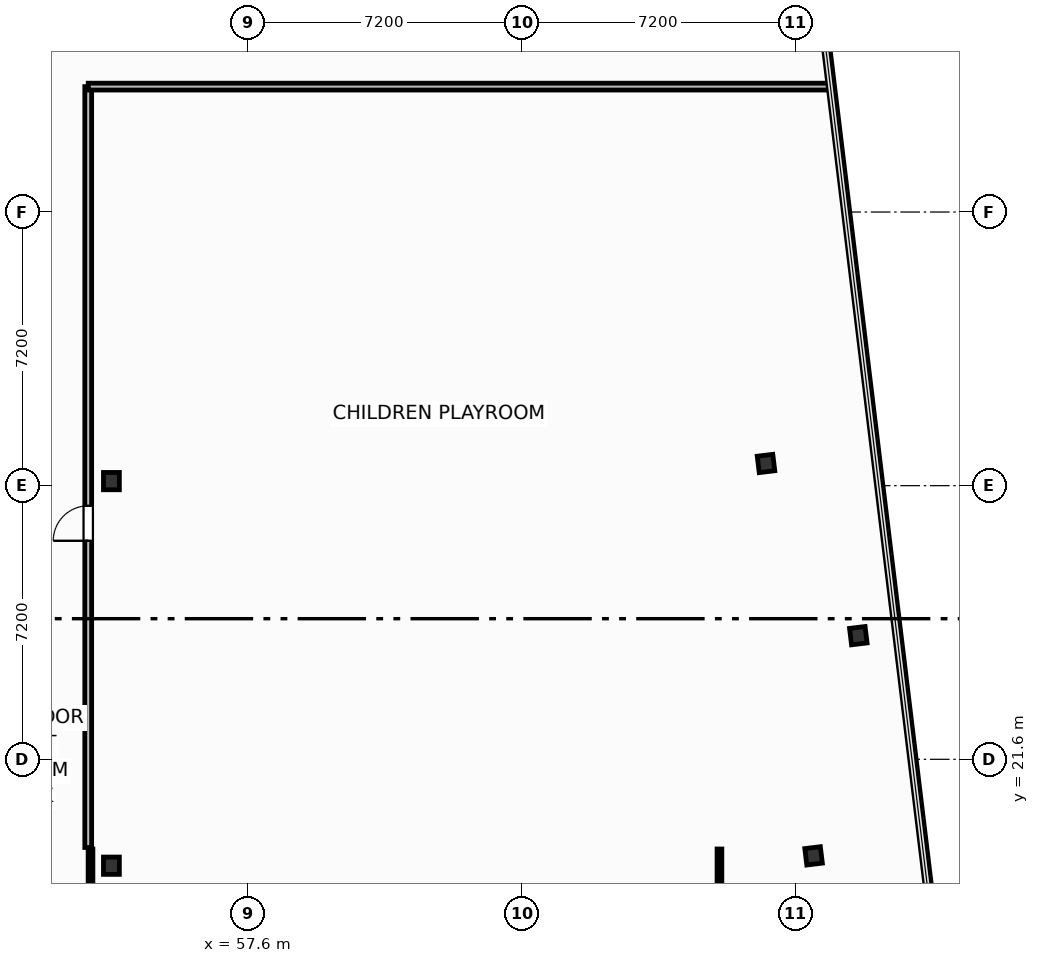
"""IFC4 building model, lengths in metres.
Left out: names, types, materials, properties, quantities, classifications, styles, units other than length and angle.
Written with IfcOpenShell. Run it as: python <this file> out.ifc"""

import sys

from ifc_helpers import new_model, si_unit, direction, frame, frame_2d, origin, origin_2d, place, context, subcontext, project, spatial, rectangle, i_section, extrude, element, fill, save


model = new_model("IFC4")
c1 = context("Model", 3, precision=1e-05, world=origin(), true_north=direction((0.0, 1.0)))
c2 = subcontext(c1, "Body", "Model", "MODEL_VIEW")
j1 = project(units=[si_unit("LENGTHUNIT", "METRE"), si_unit("PLANEANGLEUNIT", "RADIAN")], contexts=[c1])
p1 = place(None, origin())
s1 = spatial("IfcSite", under=j1, at=p1, CompositionType="ELEMENT")
p2 = place(p1, origin())
s2 = spatial("IfcBuilding", under=s1, at=p2, CompositionType="ELEMENT")
p3 = place(p2, frame((0.0, 0.0, 185.7)))
s3 = spatial("IfcBuildingStorey", under=s2, at=p3, CompositionType="ELEMENT", Elevation=185.7)
for number, where, z_axis, x_axis in (
    (1, (54.0, 18.8, 0.0), (0.0, 0.0, 1.0), (1.0, 0.0, 0.0)),
    (2, (54.0, 28.92, 0.0), (0.0, 0.0, 1.0), (1.0, 0.0, 0.0)),
):
    element("IfcColumn", number, at=place(p3, frame(where, z_axis=z_axis, x_axis=x_axis)), inside=s3, PredefinedType="COLUMN", context=c2, shape_type="SweptSolid", body=[
        extrude(i_section(OverallWidth=0.418, OverallDepth=0.455, WebThickness=0.042, FlangeThickness=0.068, FilletRadius=0.025, at=origin_2d()), origin(), (0.0, 0.0, 1.0), 3.7),
    ])
for number, where, z_axis, x_axis in (
    (3, (72.477, 19.059, 0.0), (0.0, 0.0, 1.0), (0.993, 0.12, 0.0)),
    (4, (73.654, 24.853, 0.0), (0.0, 0.0, 1.0), (0.993, 0.12, 0.0)),
    (5, (71.225, 29.384, 0.0), (0.0, 0.0, 1.0), (0.993, 0.12, 0.0)),
):
    element("IfcColumn", number, at=place(p3, frame(where, z_axis=z_axis, x_axis=x_axis)), inside=s3, PredefinedType="COLUMN", context=c2, shape_type="SweptSolid", body=[
        extrude(i_section(OverallWidth=0.412, OverallDepth=0.435, WebThickness=0.036, FlangeThickness=0.057, FilletRadius=0.025, at=origin_2d()), origin(), (0.0, 0.0, 1.0), 3.7),
    ])
p4 = place(p3, frame((53.45, 16.61, 0.0), z_axis=(0.0, 0.0, 1.0), x_axis=(0.0, 1.0, 0.0)))
e6 = element("IfcWall", 6, at=p4, inside=s3, PredefinedType="PARTITIONING", context=c2, shape_type="SweptSolid", body=[
    extrude(rectangle(XDim=2.63, YDim=0.125, at=frame_2d((1.315, 0.0))), origin(), (0.0, 0.0, 1.0), 2.662),
])
p5 = place(p3, frame((70.0, 16.61, 0.0), z_axis=(0.0, 0.0, 1.0), x_axis=(0.0, 1.0, 0.0)))
e7 = element("IfcWall", 7, at=p5, inside=s3, PredefinedType="PARTITIONING", context=c2, shape_type="SweptSolid", body=[
    extrude(rectangle(XDim=2.63, YDim=0.125, at=frame_2d((1.315, 0.0))), origin(), (0.0, 0.0, 1.0), 3.45),
])
p6 = place(p3, frame((53.39, 19.28, 0.0), z_axis=(0.0, 0.0, 1.0), x_axis=(0.0, 1.0, 0.0)))
e8 = element("IfcWall", 8, at=p6, inside=s3, PredefinedType="PARTITIONING", context=c2, shape_type="SweptSolid", body=[
    extrude(rectangle(XDim=20.02, YDim=0.18, at=frame_2d((10.01, 0.0))), origin(), (0.0, 0.0, 1.0), 3.45),
])
p7 = place(p6, frame((8.07, 0.0, 0.0)))
e9 = element("IfcOpeningElement", 9, at=p7, cuts=e8, PredefinedType="OPENING", context=c2, shape_type="SweptSolid", body=[
    extrude(rectangle(XDim=0.92, YDim=2.05, at=frame_2d((0.46, 1.025))), frame((0.0, 0.1, 0.0), z_axis=(0.0, -1.0, 0.0), x_axis=(1.0, 0.0, 0.0)), (0.0, 0.0, 1.0), 0.2),
])
p8 = place(p3, frame((53.39, 39.3, 0.0), z_axis=(0.0, 0.0, 1.0), x_axis=(1.0, 0.0, 0.0)))
e10 = element("IfcWall", 10, at=p8, inside=s3, PredefinedType="PARTITIONING", context=c2, shape_type="SweptSolid", body=[
    extrude(rectangle(XDim=19.49, YDim=0.18, at=frame_2d((9.745, 0.0))), origin(), (0.0, 0.0, 1.0), 3.45),
])
p9 = place(p7, origin())
e11 = element("IfcDoor", 11, at=p9, inside=s3, OperationType="SINGLE_SWING_LEFT", PredefinedType="DOOR", context=c2, shape_type="SweptSolid", body=[
    extrude(rectangle(XDim=0.92, YDim=2.05, at=frame_2d((0.46, 1.025))), frame((0.0, 0.025, 0.0), z_axis=(0.0, -1.0, 0.0), x_axis=(1.0, 0.0, 0.0)), (0.0, 0.0, 1.0), 0.05),
])
fill(e9, e11)
save(model, sys.argv[1])
